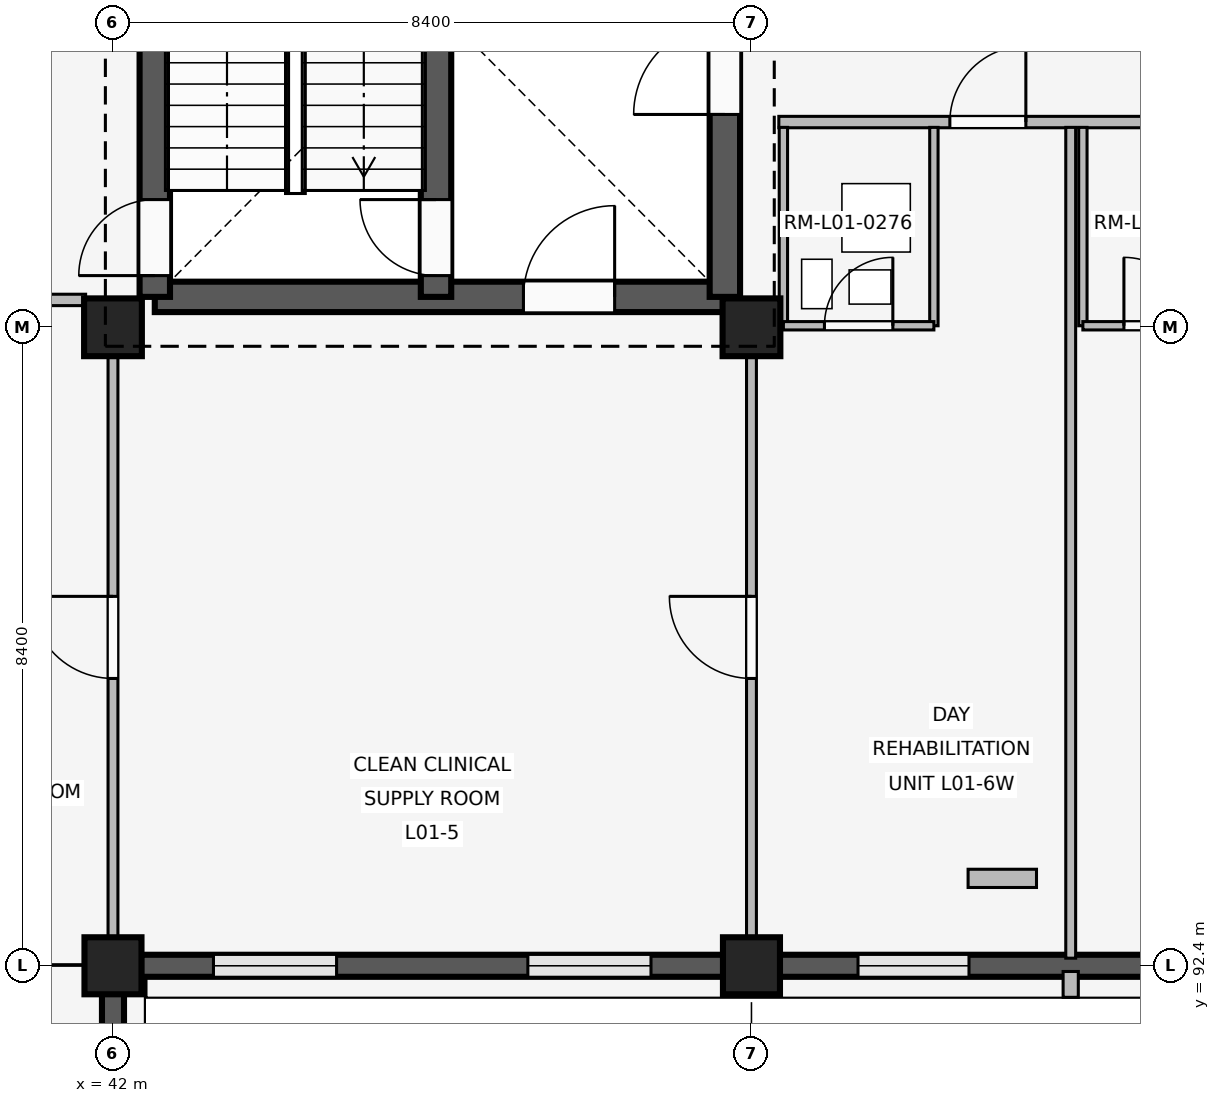
"""IFC4 building model, lengths in metres.
Left out: names, types, materials, properties, quantities, classifications, styles, units other than length and angle.
Written with IfcOpenShell. Run it as: python <this file> out.ifc"""

import sys

from ifc_helpers import new_model, si_unit, direction, frame, frame_2d, origin, origin_2d, place, context, subcontext, project, spatial, rectangle, extrude, element, fill, save


model = new_model("IFC4")
c1 = context("Model", 3, precision=1e-05, world=origin(), true_north=direction((0.0, 1.0)))
c2 = subcontext(c1, "Body", "Model", "MODEL_VIEW")
j1 = project(units=[si_unit("LENGTHUNIT", "METRE"), si_unit("PLANEANGLEUNIT", "RADIAN")], contexts=[c1])
p1 = place(None, origin())
s1 = spatial("IfcSite", under=j1, at=p1, CompositionType="ELEMENT")
p2 = place(p1, origin())
s2 = spatial("IfcBuilding", under=s1, at=p2, CompositionType="ELEMENT")
p3 = place(p2, frame((0.0, 0.0, 4.8)))
s3 = spatial("IfcBuildingStorey", under=s2, at=p3, CompositionType="ELEMENT", Elevation=4.8)
p4 = place(p3, frame((42.0, 92.4, 0.0), z_axis=(0.0, 0.0, 1.0), x_axis=(1.0, 0.0, 0.0)))
e1 = element("IfcColumn", 1, at=p4, inside=s3, PredefinedType="COLUMN", context=c2, shape_type="SweptSolid", body=[
    extrude(rectangle(XDim=0.75, YDim=0.75, at=origin_2d()), origin(), (0.0, 0.0, 1.0), 3.3),
])
p5 = place(p3, frame((42.0, 100.8, 0.0), z_axis=(0.0, 0.0, 1.0), x_axis=(1.0, 0.0, 0.0)))
e2 = element("IfcColumn", 2, at=p5, inside=s3, PredefinedType="COLUMN", context=c2, shape_type="SweptSolid", body=[
    extrude(rectangle(XDim=0.76, YDim=0.76, at=origin_2d()), origin(), (0.0, 0.0, 1.0), 3.3),
])
p6 = place(p3, frame((50.4, 92.4, 0.0), z_axis=(0.0, 0.0, 1.0), x_axis=(1.0, 0.0, 0.0)))
e3 = element("IfcColumn", 3, at=p6, inside=s3, PredefinedType="COLUMN", context=c2, shape_type="SweptSolid", body=[
    extrude(rectangle(XDim=0.75, YDim=0.75, at=origin_2d()), origin(), (0.0, 0.0, 1.0), 3.3),
])
p7 = place(p3, frame((50.4, 100.8, 0.0), z_axis=(0.0, 0.0, 1.0), x_axis=(1.0, 0.0, 0.0)))
e4 = element("IfcColumn", 4, at=p7, inside=s3, PredefinedType="COLUMN", context=c2, shape_type="SweptSolid", body=[
    extrude(rectangle(XDim=0.76, YDim=0.76, at=origin_2d()), origin(), (0.0, 0.0, 1.0), 3.3),
])
p8 = place(p3, frame((42.0, 92.03, 0.0), z_axis=(0.0, 0.0, 1.0), x_axis=(0.0, -1.0, 0.0)))
e5 = element("IfcWall", 5, at=p8, inside=s3, PredefinedType="SOLIDWALL", context=c2, shape_type="SweptSolid", body=[
    extrude(rectangle(XDim=7.66, YDim=0.29, at=frame_2d((3.83, 0.0))), origin(), (0.0, 0.0, 1.0), 2.42),
])
p9 = place(p8, frame((0.952, 0.0, 0.85)))
e6 = element("IfcOpeningElement", 6, at=p9, cuts=e5, PredefinedType="OPENING", context=c2, shape_type="SweptSolid", body=[
    extrude(rectangle(XDim=1.62, YDim=0.95, at=frame_2d((0.81, 0.475))), frame((0.0, 0.155, 0.0), z_axis=(0.0, -1.0, 0.0), x_axis=(1.0, 0.0, 0.0)), (0.0, 0.0, 1.0), 0.31),
])
p10 = place(p8, frame((5.088, 0.0, 0.85)))
e7 = element("IfcOpeningElement", 7, at=p10, cuts=e5, PredefinedType="OPENING", context=c2, shape_type="SweptSolid", body=[
    extrude(rectangle(XDim=1.62, YDim=0.95, at=frame_2d((0.81, 0.475))), frame((0.0, 0.155, 0.0), z_axis=(0.0, -1.0, 0.0), x_axis=(1.0, 0.0, 0.0)), (0.0, 0.0, 1.0), 0.31),
])
p11 = place(p3, frame((50.03, 92.4, 0.0), z_axis=(0.0, 0.0, 1.0), x_axis=(-1.0, 0.0, 0.0)))
e8 = element("IfcWall", 8, at=p11, inside=s3, PredefinedType="SOLIDWALL", context=c2, shape_type="SweptSolid", body=[
    extrude(rectangle(XDim=7.66, YDim=0.29, at=frame_2d((3.83, 0.0))), origin(), (0.0, 0.0, 1.0), 2.42),
])
p12 = place(p11, frame((0.952, 0.0, 0.85)))
e9 = element("IfcOpeningElement", 9, at=p12, cuts=e8, PredefinedType="OPENING", context=c2, shape_type="SweptSolid", body=[
    extrude(rectangle(XDim=1.62, YDim=0.95, at=frame_2d((0.81, 0.475))), frame((0.0, 0.155, 0.0), z_axis=(0.0, -1.0, 0.0), x_axis=(1.0, 0.0, 0.0)), (0.0, 0.0, 1.0), 0.31),
])
p13 = place(p11, frame((5.088, 0.0, 0.85)))
e10 = element("IfcOpeningElement", 10, at=p13, cuts=e8, PredefinedType="OPENING", context=c2, shape_type="SweptSolid", body=[
    extrude(rectangle(XDim=1.62, YDim=0.95, at=frame_2d((0.81, 0.475))), frame((0.0, 0.155, 0.0), z_axis=(0.0, -1.0, 0.0), x_axis=(1.0, 0.0, 0.0)), (0.0, 0.0, 1.0), 0.31),
])
p14 = place(p3, frame((58.43, 92.4, 0.0), z_axis=(0.0, 0.0, 1.0), x_axis=(-1.0, 0.0, 0.0)))
e11 = element("IfcWall", 11, at=p14, inside=s3, PredefinedType="SOLIDWALL", context=c2, shape_type="SweptSolid", body=[
    extrude(rectangle(XDim=7.66, YDim=0.29, at=frame_2d((3.83, 0.0))), origin(), (0.0, 0.0, 1.0), 2.42),
])
p15 = place(p14, frame((1.032, 0.0, 0.85)))
e12 = element("IfcOpeningElement", 12, at=p15, cuts=e11, PredefinedType="OPENING", context=c2, shape_type="SweptSolid", body=[
    extrude(rectangle(XDim=1.46, YDim=0.85, at=frame_2d((0.73, 0.425))), frame((0.0, 0.155, 0.0), z_axis=(0.0, -1.0, 0.0), x_axis=(1.0, 0.0, 0.0)), (0.0, 0.0, 1.0), 0.31),
])
p16 = place(p14, frame((5.168, 0.0, 0.85)))
e13 = element("IfcOpeningElement", 13, at=p16, cuts=e11, PredefinedType="OPENING", context=c2, shape_type="SweptSolid", body=[
    extrude(rectangle(XDim=1.46, YDim=0.85, at=frame_2d((0.73, 0.425))), frame((0.0, 0.155, 0.0), z_axis=(0.0, -1.0, 0.0), x_axis=(1.0, 0.0, 0.0)), (0.0, 0.0, 1.0), 0.31),
])
p17 = place(p3, frame((54.6, 92.325, 0.0), z_axis=(0.0, 0.0, 1.0), x_axis=(0.0, -1.0, 0.0)))
e14 = element("IfcWall", 14, at=p17, inside=s3, PredefinedType="ELEMENTEDWALL", context=c2, shape_type="SweptSolid", body=[
    extrude(rectangle(XDim=0.34, YDim=0.2, at=frame_2d((0.17, 0.0))), origin(), (0.0, 0.0, 1.0), 2.4),
])
p18 = place(p3, frame((42.55, 101.2, 0.0), z_axis=(0.0, 0.0, 1.0), x_axis=(1.0, 0.0, 0.0)))
e15 = element("IfcWall", 15, at=p18, inside=s3, PredefinedType="SHEAR", context=c2, shape_type="SweptSolid", body=[
    extrude(rectangle(XDim=7.5, YDim=0.4, at=frame_2d((3.75, 0.0))), origin(), (0.0, 0.0, 1.0), 3.02),
])
p19 = place(p18, frame((4.85, 0.0, 0.0)))
e16 = element("IfcOpeningElement", 16, at=p19, cuts=e15, PredefinedType="OPENING", context=c2, shape_type="SweptSolid", body=[
    extrude(rectangle(XDim=1.2, YDim=2.1, at=frame_2d((0.6, 1.05))), frame((0.0, 0.21, 0.0), z_axis=(0.0, -1.0, 0.0), x_axis=(1.0, 0.0, 0.0)), (0.0, 0.0, 1.0), 0.42),
])
p20 = place(p3, frame((42.55, 101.2, 0.0), z_axis=(0.0, 0.0, 1.0), x_axis=(0.0, 1.0, 0.0)))
e17 = element("IfcWall", 17, at=p20, inside=s3, PredefinedType="SHEAR", context=c2, shape_type="SweptSolid", body=[
    extrude(rectangle(XDim=7.55, YDim=0.4, at=frame_2d((3.775, 0.0))), origin(), (0.0, 0.0, 1.0), 3.02),
])
p21 = place(p20, frame((0.28, 0.0, 0.0)))
e18 = element("IfcOpeningElement", 18, at=p21, cuts=e17, PredefinedType="OPENING", context=c2, shape_type="SweptSolid", body=[
    extrude(rectangle(XDim=1.0, YDim=2.15, at=frame_2d((0.5, 1.075))), frame((0.0, 0.21, 0.0), z_axis=(0.0, -1.0, 0.0), x_axis=(1.0, 0.0, 0.0)), (0.0, 0.0, 1.0), 0.42),
])
p22 = place(p3, frame((50.05, 101.2, 0.0), z_axis=(0.0, 0.0, 1.0), x_axis=(0.0, 1.0, 0.0)))
e19 = element("IfcWall", 19, at=p22, inside=s3, PredefinedType="SHEAR", context=c2, shape_type="SweptSolid", body=[
    extrude(rectangle(XDim=7.55, YDim=0.4, at=frame_2d((3.775, 0.0))), origin(), (0.0, 0.0, 1.0), 3.02),
])
p23 = place(p22, frame((2.4, 0.0, 0.0)))
e20 = element("IfcOpeningElement", 20, at=p23, cuts=e19, PredefinedType="OPENING", context=c2, shape_type="SweptSolid", body=[
    extrude(rectangle(XDim=1.2, YDim=2.2, at=frame_2d((0.6, 1.1))), frame((0.0, 0.21, 0.0), z_axis=(0.0, -1.0, 0.0), x_axis=(1.0, 0.0, 0.0)), (0.0, 0.0, 1.0), 0.42),
])
p24 = place(p3, frame((46.25, 101.2, 0.0), z_axis=(0.0, 0.0, 1.0), x_axis=(0.0, 1.0, 0.0)))
e21 = element("IfcWall", 21, at=p24, inside=s3, PredefinedType="SHEAR", context=c2, shape_type="SweptSolid", body=[
    extrude(rectangle(XDim=7.55, YDim=0.4, at=frame_2d((3.775, 0.0))), origin(), (0.0, 0.0, 1.0), 3.02),
])
p25 = place(p24, frame((0.28, 0.0, 0.0)))
e22 = element("IfcOpeningElement", 22, at=p25, cuts=e21, PredefinedType="OPENING", context=c2, shape_type="SweptSolid", body=[
    extrude(rectangle(XDim=1.0, YDim=2.15, at=frame_2d((0.5, 1.075))), frame((0.0, 0.21, 0.0), z_axis=(0.0, -1.0, 0.0), x_axis=(1.0, 0.0, 0.0)), (0.0, 0.0, 1.0), 0.42),
])
p26 = place(p3, frame((39.46, 101.16, 0.0), z_axis=(0.0, 0.0, 1.0), x_axis=(1.0, 0.0, 0.0)))
e23 = element("IfcWall", 23, at=p26, inside=s3, PredefinedType="PARTITIONING", context=c2, shape_type="SweptSolid", body=[
    extrude(rectangle(XDim=2.18, YDim=0.15, at=frame_2d((1.09, 0.0))), origin(), (0.0, 0.0, 1.0), 2.4),
])
p27 = place(p26, frame((0.5, 0.0, 0.0)))
e24 = element("IfcOpeningElement", 24, at=p27, cuts=e23, PredefinedType="OPENING", context=c2, shape_type="SweptSolid", body=[
    extrude(rectangle(XDim=1.08, YDim=2.15, at=frame_2d((0.54, 1.075))), frame((0.0, 0.085, 0.0), z_axis=(0.0, -1.0, 0.0), x_axis=(1.0, 0.0, 0.0)), (0.0, 0.0, 1.0), 0.17),
])
p28 = place(p3, frame((42.0, 92.54, 0.0), z_axis=(0.0, 0.0, 1.0), x_axis=(0.0, 1.0, 0.0)))
e25 = element("IfcWall", 25, at=p28, inside=s3, PredefinedType="PARTITIONING", context=c2, shape_type="SweptSolid", body=[
    extrude(rectangle(XDim=8.21, YDim=0.13, at=frame_2d((4.105, 0.0))), origin(), (0.0, 0.0, 1.0), 2.4),
])
p29 = place(p28, frame((3.64, 0.0, 0.0)))
e26 = element("IfcOpeningElement", 26, at=p29, cuts=e25, PredefinedType="OPENING", context=c2, shape_type="SweptSolid", body=[
    extrude(rectangle(XDim=1.08, YDim=2.15, at=frame_2d((0.54, 1.075))), frame((0.0, 0.075, 0.0), z_axis=(0.0, -1.0, 0.0), x_axis=(1.0, 0.0, 0.0)), (0.0, 0.0, 1.0), 0.15),
])
p30 = place(p3, frame((50.4, 92.54, 0.0), z_axis=(0.0, 0.0, 1.0), x_axis=(0.0, 1.0, 0.0)))
e27 = element("IfcWall", 27, at=p30, inside=s3, PredefinedType="PARTITIONING", context=c2, shape_type="SweptSolid", body=[
    extrude(rectangle(XDim=8.21, YDim=0.13, at=frame_2d((4.105, 0.0))), origin(), (0.0, 0.0, 1.0), 2.4),
])
p31 = place(p30, frame((3.64, 0.0, 0.0)))
e28 = element("IfcOpeningElement", 28, at=p31, cuts=e27, PredefinedType="OPENING", context=c2, shape_type="SweptSolid", body=[
    extrude(rectangle(XDim=1.08, YDim=2.15, at=frame_2d((0.54, 1.075))), frame((0.0, 0.075, 0.0), z_axis=(0.0, -1.0, 0.0), x_axis=(1.0, 0.0, 0.0)), (0.0, 0.0, 1.0), 0.15),
])
p32 = place(p3, frame((50.76, 103.5, 0.0), z_axis=(0.0, 0.0, 1.0), x_axis=(1.0, 0.0, 0.0)))
e29 = element("IfcWall", 29, at=p32, inside=s3, PredefinedType="PARTITIONING", context=c2, shape_type="SweptSolid", body=[
    extrude(rectangle(XDim=7.96, YDim=0.15, at=frame_2d((3.98, 0.0))), origin(), (0.0, 0.0, 1.0), 2.4),
])
p33 = place(p32, frame((2.25, 0.0, 0.0)))
e30 = element("IfcOpeningElement", 30, at=p33, cuts=e29, PredefinedType="OPENING", context=c2, shape_type="SweptSolid", body=[
    extrude(rectangle(XDim=1.0, YDim=2.15, at=frame_2d((0.5, 1.075))), frame((0.0, 0.085, 0.0), z_axis=(0.0, -1.0, 0.0), x_axis=(1.0, 0.0, 0.0)), (0.0, 0.0, 1.0), 0.17),
])
p34 = place(p32, frame((5.95, 0.0, 0.0)))
e31 = element("IfcOpeningElement", 31, at=p34, cuts=e29, PredefinedType="OPENING", context=c2, shape_type="SweptSolid", body=[
    extrude(rectangle(XDim=1.0, YDim=2.15, at=frame_2d((0.5, 1.075))), frame((0.0, 0.085, 0.0), z_axis=(0.0, -1.0, 0.0), x_axis=(1.0, 0.0, 0.0)), (0.0, 0.0, 1.0), 0.17),
])
p35 = place(p3, frame((54.6, 92.5, 0.0), z_axis=(0.0, 0.0, 1.0), x_axis=(0.0, 1.0, 0.0)))
e32 = element("IfcWall", 32, at=p35, inside=s3, PredefinedType="PARTITIONING", context=c2, shape_type="SweptSolid", body=[
    extrude(rectangle(XDim=10.93, YDim=0.13, at=frame_2d((5.465, 0.0))), origin(), (0.0, 0.0, 1.0), 2.4),
])
for number, where, z_axis, x_axis in (
    (33, (50.82, 100.82, 0.0), (0.0, 0.0, 1.0), (0.0, 1.0, 0.0)),
    (34, (52.8, 100.82, 0.0), (0.0, 0.0, 1.0), (0.0, 1.0, 0.0)),
):
    element("IfcWall", number, at=place(p3, frame(where, z_axis=z_axis, x_axis=x_axis)), inside=s3, PredefinedType="PARTITIONING", context=c2, shape_type="SweptSolid", body=[
        extrude(rectangle(XDim=2.61, YDim=0.11, at=frame_2d((1.305, 0.0))), origin(), (0.0, 0.0, 1.0), 2.4),
    ])
p36 = place(p3, frame((50.82, 100.82, 0.0), z_axis=(0.0, 0.0, 1.0), x_axis=(1.0, 0.0, 0.0)))
e35 = element("IfcWall", 35, at=p36, inside=s3, PredefinedType="PARTITIONING", context=c2, shape_type="SweptSolid", body=[
    extrude(rectangle(XDim=1.98, YDim=0.11, at=frame_2d((0.99, 0.0))), origin(), (0.0, 0.0, 1.0), 2.4),
])
p37 = place(p36, frame((0.54, 0.0, 0.0)))
e36 = element("IfcOpeningElement", 36, at=p37, cuts=e35, PredefinedType="OPENING", context=c2, shape_type="SweptSolid", body=[
    extrude(rectangle(XDim=0.9, YDim=2.1, at=frame_2d((0.45, 1.05))), frame((0.0, 0.065, 0.0), z_axis=(0.0, -1.0, 0.0), x_axis=(1.0, 0.0, 0.0)), (0.0, 0.0, 1.0), 0.13),
])
p38 = place(p3, frame((54.76, 100.82, 0.0), z_axis=(0.0, 0.0, 1.0), x_axis=(0.0, 1.0, 0.0)))
e37 = element("IfcWall", 37, at=p38, inside=s3, PredefinedType="PARTITIONING", context=c2, shape_type="SweptSolid", body=[
    extrude(rectangle(XDim=2.61, YDim=0.11, at=frame_2d((1.305, 0.0))), origin(), (0.0, 0.0, 1.0), 2.4),
])
p39 = place(p3, frame((54.76, 100.82, 0.0), z_axis=(0.0, 0.0, 1.0), x_axis=(1.0, 0.0, 0.0)))
e38 = element("IfcWall", 38, at=p39, inside=s3, PredefinedType="PARTITIONING", context=c2, shape_type="SweptSolid", body=[
    extrude(rectangle(XDim=1.98, YDim=0.11, at=frame_2d((0.99, 0.0))), origin(), (0.0, 0.0, 1.0), 2.4),
])
p40 = place(p39, frame((0.54, 0.0, 0.0)))
e39 = element("IfcOpeningElement", 39, at=p40, cuts=e38, PredefinedType="OPENING", context=c2, shape_type="SweptSolid", body=[
    extrude(rectangle(XDim=0.9, YDim=2.1, at=frame_2d((0.45, 1.05))), frame((0.0, 0.065, 0.0), z_axis=(0.0, -1.0, 0.0), x_axis=(1.0, 0.0, 0.0)), (0.0, 0.0, 1.0), 0.13),
])
p41 = place(p3, frame((53.25, 93.55, 0.0), z_axis=(0.0, 0.0, 1.0), x_axis=(1.0, 0.0, 0.0)))
e40 = element("IfcWall", 40, at=p41, inside=s3, PredefinedType="PLUMBINGWALL", context=c2, shape_type="SweptSolid", body=[
    extrude(rectangle(XDim=0.9, YDim=0.24, at=frame_2d((0.45, 0.0))), origin(), (0.0, 0.0, 1.0), 2.4),
])
p42 = place(p12, origin())
e41 = element("IfcWindow", 41, at=p42, inside=s3, PartitioningType="SINGLE_PANEL", PredefinedType="WINDOW", context=c2, shape_type="SweptSolid", body=[
    extrude(rectangle(XDim=1.62, YDim=0.95, at=frame_2d((0.81, 0.475))), frame((0.0, 0.03, 0.0), z_axis=(0.0, -1.0, 0.0), x_axis=(1.0, 0.0, 0.0)), (0.0, 0.0, 1.0), 0.06),
])
fill(e9, e41)
p43 = place(p13, origin())
e42 = element("IfcWindow", 42, at=p43, inside=s3, PartitioningType="SINGLE_PANEL", PredefinedType="WINDOW", context=c2, shape_type="SweptSolid", body=[
    extrude(rectangle(XDim=1.62, YDim=0.95, at=frame_2d((0.81, 0.475))), frame((0.0, 0.03, 0.0), z_axis=(0.0, -1.0, 0.0), x_axis=(1.0, 0.0, 0.0)), (0.0, 0.0, 1.0), 0.06),
])
fill(e10, e42)
p44 = place(p16, origin())
e43 = element("IfcWindow", 43, at=p44, inside=s3, PartitioningType="SINGLE_PANEL", PredefinedType="WINDOW", context=c2, shape_type="SweptSolid", body=[
    extrude(rectangle(XDim=1.46, YDim=0.85, at=frame_2d((0.73, 0.425))), frame((0.0, 0.03, 0.0), z_axis=(0.0, -1.0, 0.0), x_axis=(1.0, 0.0, 0.0)), (0.0, 0.0, 1.0), 0.06),
])
fill(e13, e43)
p45 = place(p23, origin())
e44 = element("IfcDoor", 44, at=p45, inside=s3, OperationType="SINGLE_SWING_LEFT", PredefinedType="DOOR", context=c2, shape_type="SweptSolid", body=[
    extrude(rectangle(XDim=1.2, YDim=2.2, at=frame_2d((0.6, 1.1))), frame((0.0, 0.025, 0.0), z_axis=(0.0, -1.0, 0.0), x_axis=(1.0, 0.0, 0.0)), (0.0, 0.0, 1.0), 0.05),
])
fill(e20, e44)
p46 = place(p19, origin())
e45 = element("IfcDoor", 45, at=p46, inside=s3, OperationType="SINGLE_SWING_RIGHT", PredefinedType="DOOR", context=c2, shape_type="SweptSolid", body=[
    extrude(rectangle(XDim=1.2, YDim=2.1, at=frame_2d((0.6, 1.05))), frame((0.0, 0.025, 0.0), z_axis=(0.0, -1.0, 0.0), x_axis=(1.0, 0.0, 0.0)), (0.0, 0.0, 1.0), 0.05),
])
fill(e16, e45)
p47 = place(p21, origin())
e46 = element("IfcDoor", 46, at=p47, inside=s3, OperationType="SINGLE_SWING_LEFT", PredefinedType="DOOR", context=c2, shape_type="SweptSolid", body=[
    extrude(rectangle(XDim=1.0, YDim=2.15, at=frame_2d((0.5, 1.075))), frame((0.0, 0.025, 0.0), z_axis=(0.0, -1.0, 0.0), x_axis=(1.0, 0.0, 0.0)), (0.0, 0.0, 1.0), 0.05),
])
fill(e18, e46)
p48 = place(p25, origin())
e47 = element("IfcDoor", 47, at=p48, inside=s3, OperationType="SINGLE_SWING_RIGHT", PredefinedType="DOOR", context=c2, shape_type="SweptSolid", body=[
    extrude(rectangle(XDim=1.0, YDim=2.15, at=frame_2d((0.5, 1.075))), frame((0.0, 0.025, 0.0), z_axis=(0.0, -1.0, 0.0), x_axis=(1.0, 0.0, 0.0)), (0.0, 0.0, 1.0), 0.05),
])
fill(e22, e47)
p49 = place(p29, origin())
e48 = element("IfcDoor", 48, at=p49, inside=s3, OperationType="SINGLE_SWING_RIGHT", PredefinedType="DOOR", context=c2, shape_type="SweptSolid", body=[
    extrude(rectangle(XDim=1.08, YDim=2.15, at=frame_2d((0.54, 1.075))), frame((0.0, 0.025, 0.0), z_axis=(0.0, -1.0, 0.0), x_axis=(1.0, 0.0, 0.0)), (0.0, 0.0, 1.0), 0.05),
])
fill(e26, e48)
p50 = place(p31, origin())
e49 = element("IfcDoor", 49, at=p50, inside=s3, OperationType="SINGLE_SWING_RIGHT", PredefinedType="DOOR", context=c2, shape_type="SweptSolid", body=[
    extrude(rectangle(XDim=1.08, YDim=2.15, at=frame_2d((0.54, 1.075))), frame((0.0, 0.025, 0.0), z_axis=(0.0, -1.0, 0.0), x_axis=(1.0, 0.0, 0.0)), (0.0, 0.0, 1.0), 0.05),
])
fill(e28, e49)
p51 = place(p33, origin())
e50 = element("IfcDoor", 50, at=p51, inside=s3, OperationType="SINGLE_SWING_RIGHT", PredefinedType="DOOR", context=c2, shape_type="SweptSolid", body=[
    extrude(rectangle(XDim=1.0, YDim=2.15, at=frame_2d((0.5, 1.075))), frame((0.0, 0.025, 0.0), z_axis=(0.0, -1.0, 0.0), x_axis=(1.0, 0.0, 0.0)), (0.0, 0.0, 1.0), 0.05),
])
fill(e30, e50)
p52 = place(p37, origin())
e51 = element("IfcDoor", 51, at=p52, inside=s3, OperationType="SINGLE_SWING_RIGHT", PredefinedType="DOOR", context=c2, shape_type="SweptSolid", body=[
    extrude(rectangle(XDim=0.9, YDim=2.1, at=frame_2d((0.45, 1.05))), frame((0.0, 0.025, 0.0), z_axis=(0.0, -1.0, 0.0), x_axis=(1.0, 0.0, 0.0)), (0.0, 0.0, 1.0), 0.05),
])
fill(e36, e51)
p53 = place(p40, origin())
e52 = element("IfcDoor", 52, at=p53, inside=s3, OperationType="SINGLE_SWING_LEFT", PredefinedType="DOOR", context=c2, shape_type="SweptSolid", body=[
    extrude(rectangle(XDim=0.9, YDim=2.1, at=frame_2d((0.45, 1.05))), frame((0.0, 0.025, 0.0), z_axis=(0.0, -1.0, 0.0), x_axis=(1.0, 0.0, 0.0)), (0.0, 0.0, 1.0), 0.05),
])
fill(e39, e52)
save(model, sys.argv[1])
